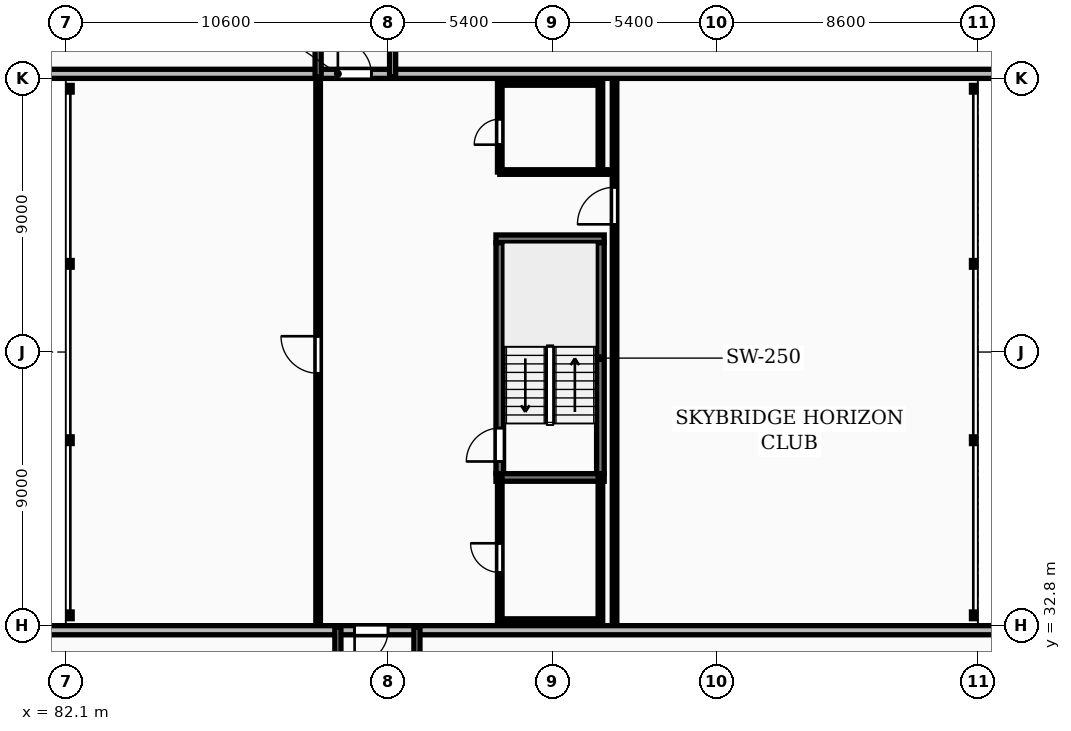
"""IFC4 building model, lengths in metres.
Left out: names, types, materials, properties, quantities, classifications, styles, units other than length and angle.
Written with IfcOpenShell. Run it as: python <this file> out.ifc"""

import sys

from ifc_helpers import new_model, si_unit, direction, frame, frame_2d, origin, place, context, subcontext, project, spatial, rectangle, extrude, element, fill, save


model = new_model("IFC4")
c1 = context("Model", 3, precision=1e-05, world=origin(), true_north=direction((0.0, 1.0)))
c2 = subcontext(c1, "Body", "Model", "MODEL_VIEW")
j1 = project(units=[si_unit("LENGTHUNIT", "METRE"), si_unit("PLANEANGLEUNIT", "RADIAN")], contexts=[c1])
p1 = place(None, origin())
s1 = spatial("IfcSite", under=j1, at=p1, CompositionType="ELEMENT")
p2 = place(p1, origin())
s2 = spatial("IfcBuilding", under=s1, at=p2, CompositionType="ELEMENT")
p3 = place(p2, frame((0.0, 0.0, 142.9)))
s3 = spatial("IfcBuildingStorey", under=s2, at=p3, CompositionType="ELEMENT", Elevation=142.9)
p4 = place(p3, frame((57.6, 50.95, 0.0), z_axis=(0.0, 0.0, 1.0), x_axis=(1.0, 0.0, 0.0)))
e1 = element("IfcWall", 1, at=p4, inside=s3, PredefinedType="STANDARD", context=c2, shape_type="SweptSolid", body=[
    extrude(rectangle(XDim=73.0, YDim=0.3, at=frame_2d((36.5, 0.0))), origin(), (0.0, 0.0, 1.0), 3.31),
])
p5 = place(p4, frame((15.225, 0.0, 0.85)))
e2 = element("IfcOpeningElement", 2, at=p5, cuts=e1, PredefinedType="OPENING", context=c2, shape_type="SweptSolid", body=[
    extrude(rectangle(XDim=1.8, YDim=1.8, at=frame_2d((0.9, 0.9))), frame((0.0, 0.16, 0.0), z_axis=(0.0, -1.0, 0.0), x_axis=(1.0, 0.0, 0.0)), (0.0, 0.0, 1.0), 0.32),
])
p6 = place(p4, frame((58.575, 0.0, 0.85)))
e3 = element("IfcOpeningElement", 3, at=p6, cuts=e1, PredefinedType="OPENING", context=c2, shape_type="SweptSolid", body=[
    extrude(rectangle(XDim=1.8, YDim=1.8, at=frame_2d((0.9, 0.9))), frame((0.0, 0.16, 0.0), z_axis=(0.0, -1.0, 0.0), x_axis=(1.0, 0.0, 0.0)), (0.0, 0.0, 1.0), 0.32),
])
p7 = place(p4, frame((33.45, 0.0, 0.0)))
e4 = element("IfcOpeningElement", 4, at=p7, cuts=e1, PredefinedType="OPENING", context=c2, shape_type="SweptSolid", body=[
    extrude(rectangle(XDim=1.1, YDim=2.1, at=frame_2d((0.55, 1.05))), frame((0.0, 0.16, 0.0), z_axis=(0.0, -1.0, 0.0), x_axis=(1.0, 0.0, 0.0)), (0.0, 0.0, 1.0), 0.32),
])
p8 = place(p3, frame((130.7, 32.65, 0.0), z_axis=(0.0, 0.0, 1.0), x_axis=(-1.0, 0.0, 0.0)))
e5 = element("IfcWall", 5, at=p8, inside=s3, PredefinedType="STANDARD", context=c2, shape_type="SweptSolid", body=[
    extrude(rectangle(XDim=58.0, YDim=0.3, at=frame_2d((29.0, 0.0))), origin(), (0.0, 0.0, 1.0), 3.31),
])
p9 = place(p8, frame((50.125, 0.0, 0.85)))
e6 = element("IfcOpeningElement", 6, at=p9, cuts=e5, PredefinedType="OPENING", context=c2, shape_type="SweptSolid", body=[
    extrude(rectangle(XDim=1.8, YDim=1.8, at=frame_2d((0.9, 0.9))), frame((0.0, 0.16, 0.0), z_axis=(0.0, -1.0, 0.0), x_axis=(1.0, 0.0, 0.0)), (0.0, 0.0, 1.0), 0.32),
])
p10 = place(p8, frame((6.775, 0.0, 0.85)))
e7 = element("IfcOpeningElement", 7, at=p10, cuts=e5, PredefinedType="OPENING", context=c2, shape_type="SweptSolid", body=[
    extrude(rectangle(XDim=1.8, YDim=1.8, at=frame_2d((0.9, 0.9))), frame((0.0, 0.16, 0.0), z_axis=(0.0, -1.0, 0.0), x_axis=(1.0, 0.0, 0.0)), (0.0, 0.0, 1.0), 0.32),
])
p11 = place(p8, frame((38.0, 0.0, 0.0)))
e8 = element("IfcOpeningElement", 8, at=p11, cuts=e5, PredefinedType="OPENING", context=c2, shape_type="SweptSolid", body=[
    extrude(rectangle(XDim=1.1, YDim=2.1, at=frame_2d((0.55, 1.05))), frame((0.0, 0.16, 0.0), z_axis=(0.0, -1.0, 0.0), x_axis=(1.0, 0.0, 0.0)), (0.0, 0.0, 1.0), 0.32),
])
for number, where, z_axis, x_axis in (
    (9, (90.4, 50.85, 0.0), (0.0, 0.0, 1.0), (0.0, 1.0, 0.0)),
    (10, (92.85, 50.85, 0.0), (0.0, 0.0, 1.0), (0.0, 1.0, 0.0)),
):
    element("IfcWall", number, at=place(p3, frame(where, z_axis=z_axis, x_axis=x_axis)), inside=s3, PredefinedType="PARTITIONING", context=c2, shape_type="SweptSolid", body=[
        extrude(rectangle(XDim=4.2, YDim=0.2, at=frame_2d((2.1, 0.0))), origin(), (0.0, 0.0, 1.0), 3.31),
    ])
p12 = place(p3, frame((91.05, 30.55, 0.0), z_axis=(0.0, 0.0, 1.0), x_axis=(0.0, 1.0, 0.0)))
e11 = element("IfcWall", 11, at=p12, inside=s3, PredefinedType="PARTITIONING", context=c2, shape_type="SweptSolid", body=[
    extrude(rectangle(XDim=2.2, YDim=0.2, at=frame_2d((1.1, 0.0))), origin(), (0.0, 0.0, 1.0), 3.31),
])
p13 = place(p3, frame((93.65, 30.55, 0.0), z_axis=(0.0, 0.0, 1.0), x_axis=(0.0, 1.0, 0.0)))
e12 = element("IfcWall", 12, at=p13, inside=s3, PredefinedType="PARTITIONING", context=c2, shape_type="SweptSolid", body=[
    extrude(rectangle(XDim=2.2, YDim=0.2, at=frame_2d((1.1, 0.0))), origin(), (0.0, 0.0, 1.0), 2.384),
])
p14 = place(p3, frame((96.375, 37.8, 0.0), z_axis=(0.0, 0.0, 1.0), x_axis=(0.0, 1.0, 0.0)))
e13 = element("IfcWall", 13, at=p14, inside=s3, PredefinedType="SHEAR", context=c2, shape_type="SweptSolid", body=[
    extrude(rectangle(XDim=7.6, YDim=0.25, at=frame_2d((3.8, 0.0))), origin(), (0.0, 0.0, 1.0), 3.6),
])
p15 = place(p14, frame((0.4, 0.0, 0.0)))
e14 = element("IfcOpeningElement", 14, at=p15, cuts=e13, PredefinedType="OPENING", context=c2, shape_type="SweptSolid", body=[
    extrude(rectangle(XDim=1.1, YDim=2.1, at=frame_2d((0.55, 1.05))), frame((0.0, 0.135, 0.0), z_axis=(0.0, -1.0, 0.0), x_axis=(1.0, 0.0, 0.0)), (0.0, 0.0, 1.0), 0.27),
])
p16 = place(p3, frame((99.685, 37.8, 0.0), z_axis=(0.0, 0.0, 1.0), x_axis=(0.0, 1.0, 0.0)))
e15 = element("IfcWall", 15, at=p16, inside=s3, PredefinedType="SHEAR", context=c2, shape_type="SweptSolid", body=[
    extrude(rectangle(XDim=7.6, YDim=0.25, at=frame_2d((3.8, 0.0))), origin(), (0.0, 0.0, 1.0), 3.6),
])
for number, where, z_axis, x_axis in (
    (16, (96.25, 37.675, 0.0), (0.0, 0.0, 1.0), (1.0, 0.0, 0.0)),
    (17, (96.25, 45.525, 0.0), (0.0, 0.0, 1.0), (1.0, 0.0, 0.0)),
):
    element("IfcWall", number, at=place(p3, frame(where, z_axis=z_axis, x_axis=x_axis)), inside=s3, PredefinedType="SHEAR", context=c2, shape_type="SweptSolid", body=[
        extrude(rectangle(XDim=3.56, YDim=0.25, at=frame_2d((1.78, 0.0))), origin(), (0.0, 0.0, 1.0), 3.6),
    ])
for number, where, z_axis, x_axis in (
    (18, (96.375, 32.95, 0.0), (0.0, 0.0, 1.0), (1.0, 0.0, 0.0)),
    (19, (96.375, 50.65, 0.0), (0.0, 0.0, 1.0), (1.0, 0.0, 0.0)),
):
    element("IfcWall", number, at=place(p3, frame(where, z_axis=z_axis, x_axis=x_axis)), inside=s3, PredefinedType="PARTITIONING", context=c2, shape_type="SweptSolid", body=[
        extrude(rectangle(XDim=3.31, YDim=0.15, at=frame_2d((1.655, 0.0))), origin(), (0.0, 0.0, 1.0), 2.69),
    ])
p17 = place(p3, frame((96.375, 32.95, 0.0), z_axis=(0.0, 0.0, 1.0), x_axis=(0.0, 1.0, 0.0)))
e20 = element("IfcWall", 20, at=p17, inside=s3, PredefinedType="PARTITIONING", context=c2, shape_type="SweptSolid", body=[
    extrude(rectangle(XDim=4.725, YDim=0.15, at=frame_2d((2.363, 0.0))), origin(), (0.0, 0.0, 1.0), 2.384),
])
p18 = place(p17, frame((1.6, 0.0, 0.0)))
e21 = element("IfcOpeningElement", 21, at=p18, cuts=e20, PredefinedType="OPENING", context=c2, shape_type="SweptSolid", body=[
    extrude(rectangle(XDim=0.96, YDim=2.1, at=frame_2d((0.48, 1.05))), frame((0.0, 0.085, 0.0), z_axis=(0.0, -1.0, 0.0), x_axis=(1.0, 0.0, 0.0)), (0.0, 0.0, 1.0), 0.17),
])
p19 = place(p3, frame((96.375, 47.72, 0.0), z_axis=(0.0, 0.0, 1.0), x_axis=(0.0, 1.0, 0.0)))
e22 = element("IfcWall", 22, at=p19, inside=s3, PredefinedType="PARTITIONING", context=c2, shape_type="SweptSolid", body=[
    extrude(rectangle(XDim=2.93, YDim=0.15, at=frame_2d((1.465, 0.0))), origin(), (0.0, 0.0, 1.0), 2.384),
])
p20 = place(p19, frame((0.9, 0.0, 0.0)))
e23 = element("IfcOpeningElement", 23, at=p20, cuts=e22, PredefinedType="OPENING", context=c2, shape_type="SweptSolid", body=[
    extrude(rectangle(XDim=0.84, YDim=2.04, at=frame_2d((0.42, 1.02))), frame((0.0, 0.085, 0.0), z_axis=(0.0, -1.0, 0.0), x_axis=(1.0, 0.0, 0.0)), (0.0, 0.0, 1.0), 0.17),
])
p21 = place(p3, frame((96.375, 47.72, 0.0), z_axis=(0.0, 0.0, 1.0), x_axis=(1.0, 0.0, 0.0)))
e24 = element("IfcWall", 24, at=p21, inside=s3, PredefinedType="PARTITIONING", context=c2, shape_type="SweptSolid", body=[
    extrude(rectangle(XDim=3.775, YDim=0.15, at=frame_2d((1.887, 0.0))), origin(), (0.0, 0.0, 1.0), 3.31),
])
p22 = place(p3, frame((99.685, 32.95, 0.0), z_axis=(0.0, 0.0, 1.0), x_axis=(0.0, 1.0, 0.0)))
e25 = element("IfcWall", 25, at=p22, inside=s3, PredefinedType="PARTITIONING", context=c2, shape_type="SweptSolid", body=[
    extrude(rectangle(XDim=4.725, YDim=0.15, at=frame_2d((2.363, 0.0))), origin(), (0.0, 0.0, 1.0), 2.384),
])
p23 = place(p3, frame((99.685, 47.72, 0.0), z_axis=(0.0, 0.0, 1.0), x_axis=(0.0, 1.0, 0.0)))
e26 = element("IfcWall", 26, at=p23, inside=s3, PredefinedType="PARTITIONING", context=c2, shape_type="SweptSolid", body=[
    extrude(rectangle(XDim=2.93, YDim=0.15, at=frame_2d((1.465, 0.0))), origin(), (0.0, 0.0, 1.0), 2.384),
])
p24 = place(p3, frame((90.4, 32.9, 0.0), z_axis=(0.0, 0.0, 1.0), x_axis=(0.0, 1.0, 0.0)))
e27 = element("IfcWall", 27, at=p24, inside=s3, PredefinedType="PARTITIONING", context=c2, shape_type="SweptSolid", body=[
    extrude(rectangle(XDim=17.8, YDim=0.15, at=frame_2d((8.9, 0.0))), origin(), (0.0, 0.0, 1.0), 3.31),
])
p25 = place(p24, frame((8.2, 0.0, 0.0)))
e28 = element("IfcOpeningElement", 28, at=p25, cuts=e27, PredefinedType="OPENING", context=c2, shape_type="SweptSolid", body=[
    extrude(rectangle(XDim=1.22, YDim=2.18, at=frame_2d((0.61, 1.09))), frame((0.0, 0.085, 0.0), z_axis=(0.0, -1.0, 0.0), x_axis=(1.0, 0.0, 0.0)), (0.0, 0.0, 1.0), 0.17),
])
p26 = place(p3, frame((100.15, 32.9, 0.0), z_axis=(0.0, 0.0, 1.0), x_axis=(0.0, 1.0, 0.0)))
e29 = element("IfcWall", 29, at=p26, inside=s3, PredefinedType="PARTITIONING", context=c2, shape_type="SweptSolid", body=[
    extrude(rectangle(XDim=17.8, YDim=0.15, at=frame_2d((8.9, 0.0))), origin(), (0.0, 0.0, 1.0), 3.31),
])
p27 = place(p26, frame((13.1, 0.0, 0.0)))
e30 = element("IfcOpeningElement", 30, at=p27, cuts=e29, PredefinedType="OPENING", context=c2, shape_type="SweptSolid", body=[
    extrude(rectangle(XDim=1.22, YDim=2.18, at=frame_2d((0.61, 1.09))), frame((0.0, 0.085, 0.0), z_axis=(0.0, -1.0, 0.0), x_axis=(1.0, 0.0, 0.0)), (0.0, 0.0, 1.0), 0.17),
])
p28 = place(p7, origin())
e31 = element("IfcDoor", 31, at=p28, inside=s3, OperationType="SINGLE_SWING_LEFT", PredefinedType="DOOR", context=c2, shape_type="SweptSolid", body=[
    extrude(rectangle(XDim=1.1, YDim=2.1, at=frame_2d((0.55, 1.05))), frame((0.0, 0.025, 0.0), z_axis=(0.0, -1.0, 0.0), x_axis=(1.0, 0.0, 0.0)), (0.0, 0.0, 1.0), 0.05),
])
fill(e4, e31)
p29 = place(p11, origin())
e32 = element("IfcDoor", 32, at=p29, inside=s3, OperationType="SINGLE_SWING_RIGHT", PredefinedType="DOOR", context=c2, shape_type="SweptSolid", body=[
    extrude(rectangle(XDim=1.1, YDim=2.1, at=frame_2d((0.55, 1.05))), frame((0.0, 0.025, 0.0), z_axis=(0.0, -1.0, 0.0), x_axis=(1.0, 0.0, 0.0)), (0.0, 0.0, 1.0), 0.05),
])
fill(e8, e32)
p30 = place(p15, origin())
e33 = element("IfcDoor", 33, at=p30, inside=s3, OperationType="SINGLE_SWING_LEFT", PredefinedType="DOOR", context=c2, shape_type="SweptSolid", body=[
    extrude(rectangle(XDim=1.1, YDim=2.1, at=frame_2d((0.55, 1.05))), frame((0.0, 0.025, 0.0), z_axis=(0.0, -1.0, 0.0), x_axis=(1.0, 0.0, 0.0)), (0.0, 0.0, 1.0), 0.05),
])
fill(e14, e33)
p31 = place(p18, origin())
e34 = element("IfcDoor", 34, at=p31, inside=s3, OperationType="SINGLE_SWING_RIGHT", PredefinedType="DOOR", context=c2, shape_type="SweptSolid", body=[
    extrude(rectangle(XDim=0.96, YDim=2.1, at=frame_2d((0.48, 1.05))), frame((0.0, 0.025, 0.0), z_axis=(0.0, -1.0, 0.0), x_axis=(1.0, 0.0, 0.0)), (0.0, 0.0, 1.0), 0.05),
])
fill(e21, e34)
p32 = place(p20, origin())
e35 = element("IfcDoor", 35, at=p32, inside=s3, OperationType="SINGLE_SWING_LEFT", PredefinedType="DOOR", context=c2, shape_type="SweptSolid", body=[
    extrude(rectangle(XDim=0.84, YDim=2.04, at=frame_2d((0.42, 1.02))), frame((0.0, 0.025, 0.0), z_axis=(0.0, -1.0, 0.0), x_axis=(1.0, 0.0, 0.0)), (0.0, 0.0, 1.0), 0.05),
])
fill(e23, e35)
p33 = place(p25, origin())
e36 = element("IfcDoor", 36, at=p33, inside=s3, OperationType="SINGLE_SWING_RIGHT", PredefinedType="DOOR", context=c2, shape_type="SweptSolid", body=[
    extrude(rectangle(XDim=1.22, YDim=2.18, at=frame_2d((0.61, 1.09))), frame((0.0, 0.025, 0.0), z_axis=(0.0, -1.0, 0.0), x_axis=(1.0, 0.0, 0.0)), (0.0, 0.0, 1.0), 0.05),
])
fill(e28, e36)
p34 = place(p27, origin())
e37 = element("IfcDoor", 37, at=p34, inside=s3, OperationType="SINGLE_SWING_LEFT", PredefinedType="DOOR", context=c2, shape_type="SweptSolid", body=[
    extrude(rectangle(XDim=1.22, YDim=2.18, at=frame_2d((0.61, 1.09))), frame((0.0, 0.025, 0.0), z_axis=(0.0, -1.0, 0.0), x_axis=(1.0, 0.0, 0.0)), (0.0, 0.0, 1.0), 0.05),
])
fill(e30, e37)
save(model, sys.argv[1])
